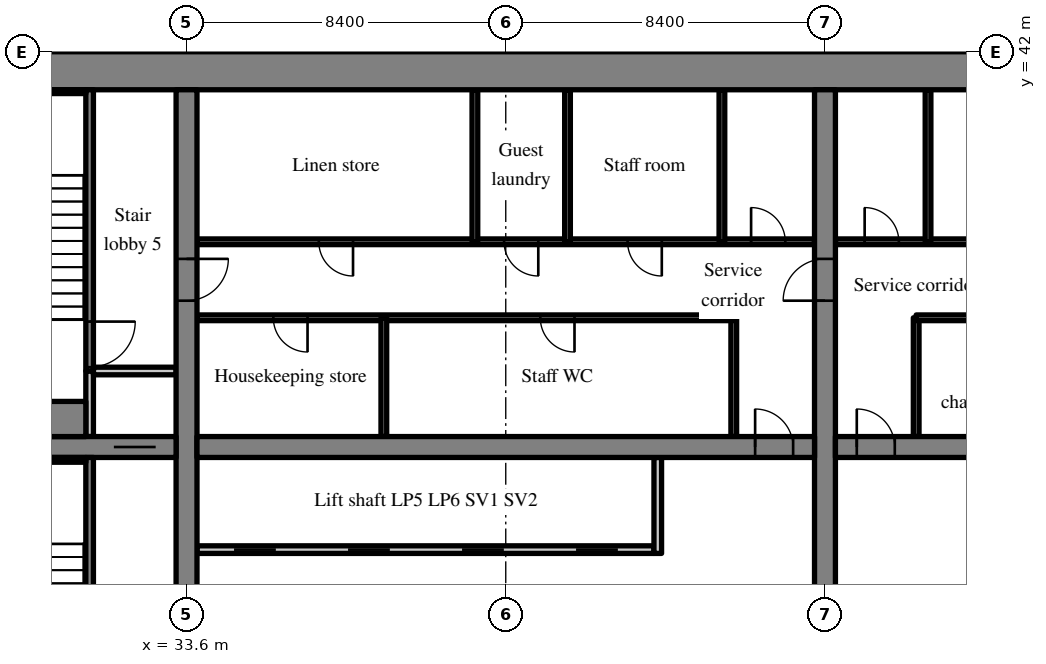
"""IFC4 building model, lengths in metres.
Left out: names, types, materials, properties, quantities, classifications, styles, units other than length and angle.
Written with IfcOpenShell. Run it as: python <this file> out.ifc"""

import sys

from ifc_helpers import new_model, si_unit, direction, frame, frame_2d, origin, place, context, subcontext, project, spatial, rectangle, extrude, source, transform, mapped, element, fill, save


model = new_model("IFC4")
c1 = context("Model", 3, precision=1e-05, world=origin(), true_north=direction((0.0, 1.0)))
c2 = subcontext(c1, "Body", "Model", "MODEL_VIEW")
j1 = project(units=[si_unit("LENGTHUNIT", "METRE"), si_unit("PLANEANGLEUNIT", "RADIAN")], contexts=[c1])
p1 = place(None, origin())
s1 = spatial("IfcSite", under=j1, at=p1, CompositionType="ELEMENT")
p2 = place(p1, origin())
s2 = spatial("IfcBuilding", under=s1, at=p2, CompositionType="ELEMENT")
p3 = place(p2, frame((0.0, 0.0, 58.2)))
s3 = spatial("IfcBuildingStorey", under=s2, at=p3, CompositionType="ELEMENT", Elevation=58.2)
m1 = source(origin(), c2, "Body", "SweptSolid", [
    extrude(rectangle(XDim=50.4, YDim=1.0, at=frame_2d((25.2, 0.0))), origin(), (0.0, 0.0, 1.0), 3.52),
])
p4 = place(p3, frame((25.2, 41.5, 0.0), z_axis=(0.0, 0.0, 1.0), x_axis=(1.0, 0.0, 0.0)))
e1 = element("IfcWall", 1, at=p4, inside=s3, PredefinedType="SHEAR", context=c2, shape_type="MappedRepresentation", body=[
    mapped(m1, transform((0.0, 0.0, 0.0), scale=1.0)),
])
m2 = source(origin(), c2, "Body", "SweptSolid", [
    extrude(rectangle(XDim=18.0, YDim=0.55, at=frame_2d((9.0, 0.0))), origin(), (0.0, 0.0, 1.0), 3.52),
])
p5 = place(p3, frame((33.6, 23.0, 0.0), z_axis=(0.0, 0.0, 1.0), x_axis=(0.0, 1.0, 0.0)))
e2 = element("IfcWall", 2, at=p5, inside=s3, PredefinedType="SHEAR", context=c2, shape_type="MappedRepresentation", body=[
    mapped(m2, transform((0.0, 0.0, 0.0), scale=1.0)),
])
m3 = source(origin(), c2, "Body", "SweptSolid", [
    extrude(rectangle(XDim=1.1, YDim=2.1, at=frame_2d((0.55, 1.05))), frame((0.0, 0.285, 0.0), z_axis=(0.0, -1.0, 0.0), x_axis=(1.0, 0.0, 0.0)), (0.0, 0.0, 1.0), 0.57),
])
p6 = place(p5, frame((12.45, 0.0, 0.0)))
e3 = element("IfcOpeningElement", 3, at=p6, cuts=e2, PredefinedType="OPENING", context=c2, shape_type="MappedRepresentation", body=[
    mapped(m3, transform((0.0, 0.0, 0.0), scale=1.0)),
])
p7 = place(p3, frame((50.4, 23.0, 0.0), z_axis=(0.0, 0.0, 1.0), x_axis=(0.0, 1.0, 0.0)))
e4 = element("IfcWall", 4, at=p7, inside=s3, PredefinedType="SHEAR", context=c2, shape_type="MappedRepresentation", body=[
    mapped(m2, transform((0.0, 0.0, 0.0), scale=1.0)),
])
p8 = place(p7, frame((12.45, 0.0, 0.0)))
e5 = element("IfcOpeningElement", 5, at=p8, cuts=e4, PredefinedType="OPENING", context=c2, shape_type="MappedRepresentation", body=[
    mapped(m3, transform((0.0, 0.0, 0.0), scale=1.0)),
])
m4 = source(origin(), c2, "Body", "SweptSolid", [
    extrude(rectangle(XDim=7.125, YDim=0.55, at=frame_2d((3.562, 0.0))), origin(), (0.0, 0.0, 1.0), 3.52),
])
p9 = place(p3, frame((26.2, 31.6, 0.0), z_axis=(0.0, 0.0, 1.0), x_axis=(1.0, 0.0, 0.0)))
e6 = element("IfcWall", 6, at=p9, inside=s3, PredefinedType="SHEAR", context=c2, shape_type="MappedRepresentation", body=[
    mapped(m4, transform((0.0, 0.0, 0.0), scale=1.0)),
])
p10 = place(p9, frame((5.488, 0.0, 0.0)))
e7 = element("IfcOpeningElement", 7, at=p10, cuts=e6, PredefinedType="OPENING", context=c2, shape_type="MappedRepresentation", body=[
    mapped(m3, transform((0.0, 0.0, 0.0), scale=1.0)),
])
m5 = source(origin(), c2, "Body", "SweptSolid", [
    extrude(rectangle(XDim=16.25, YDim=0.55, at=frame_2d((8.125, 0.0))), origin(), (0.0, 0.0, 1.0), 3.52),
])
p11 = place(p3, frame((33.875, 31.6, 0.0), z_axis=(0.0, 0.0, 1.0), x_axis=(1.0, 0.0, 0.0)))
e8 = element("IfcWall", 8, at=p11, inside=s3, PredefinedType="SHEAR", context=c2, shape_type="MappedRepresentation", body=[
    mapped(m5, transform((0.0, 0.0, 0.0), scale=1.0)),
])
m6 = source(origin(), c2, "Body", "SweptSolid", [
    extrude(rectangle(XDim=1.0, YDim=2.1, at=frame_2d((0.5, 1.05))), frame((0.0, 0.285, 0.0), z_axis=(0.0, -1.0, 0.0), x_axis=(1.0, 0.0, 0.0)), (0.0, 0.0, 1.0), 0.57),
])
p12 = place(p11, frame((14.687, 0.0, 0.0)))
e9 = element("IfcOpeningElement", 9, at=p12, cuts=e8, PredefinedType="OPENING", context=c2, shape_type="MappedRepresentation", body=[
    mapped(m6, transform((0.0, 0.0, 0.0), scale=1.0)),
])
p13 = place(p3, frame((50.675, 31.6, 0.0), z_axis=(0.0, 0.0, 1.0), x_axis=(1.0, 0.0, 0.0)))
e10 = element("IfcWall", 10, at=p13, inside=s3, PredefinedType="SHEAR", context=c2, shape_type="MappedRepresentation", body=[
    mapped(m5, transform((0.0, 0.0, 0.0), scale=1.0)),
])
p14 = place(p13, frame((0.562, 0.0, 0.0)))
e11 = element("IfcOpeningElement", 11, at=p14, cuts=e10, PredefinedType="OPENING", context=c2, shape_type="MappedRepresentation", body=[
    mapped(m6, transform((0.0, 0.0, 0.0), scale=1.0)),
])
m7 = source(origin(), c2, "Body", "SweptSolid", [
    extrude(rectangle(XDim=12.025, YDim=0.2, at=frame_2d((6.012, 0.0))), origin(), (0.0, 0.0, 1.0), 3.52),
])
p15 = place(p3, frame((33.875, 28.9, 0.0), z_axis=(0.0, 0.0, 1.0), x_axis=(1.0, 0.0, 0.0)))
e12 = element("IfcWall", 12, at=p15, inside=s3, PredefinedType="SOLIDWALL", context=c2, shape_type="MappedRepresentation", body=[
    mapped(m7, transform((0.0, 0.0, 0.0), scale=1.0)),
])
m8 = source(origin(), c2, "Body", "SweptSolid", [
    extrude(rectangle(XDim=1.1, YDim=2.1, at=frame_2d((0.55, 1.05))), frame((0.0, 0.11, 0.0), z_axis=(0.0, -1.0, 0.0), x_axis=(1.0, 0.0, 0.0)), (0.0, 0.0, 1.0), 0.22),
])
p16 = place(p15, frame((0.975, 0.0, 0.0)))
e13 = element("IfcOpeningElement", 13, at=p16, cuts=e12, PredefinedType="OPENING", context=c2, shape_type="MappedRepresentation", body=[
    mapped(m8, transform((0.0, 0.0, 0.0), scale=1.0)),
])
p17 = place(p15, frame((3.975, 0.0, 0.0)))
e14 = element("IfcOpeningElement", 14, at=p17, cuts=e12, PredefinedType="OPENING", context=c2, shape_type="MappedRepresentation", body=[
    mapped(m8, transform((0.0, 0.0, 0.0), scale=1.0)),
])
p18 = place(p15, frame((6.975, 0.0, 0.0)))
e15 = element("IfcOpeningElement", 15, at=p18, cuts=e12, PredefinedType="OPENING", context=c2, shape_type="MappedRepresentation", body=[
    mapped(m8, transform((0.0, 0.0, 0.0), scale=1.0)),
])
p19 = place(p15, frame((9.975, 0.0, 0.0)))
e16 = element("IfcOpeningElement", 16, at=p19, cuts=e12, PredefinedType="OPENING", context=c2, shape_type="MappedRepresentation", body=[
    mapped(m8, transform((0.0, 0.0, 0.0), scale=1.0)),
])
m9 = source(origin(), c2, "Body", "SweptSolid", [
    extrude(rectangle(XDim=2.525, YDim=0.2, at=frame_2d((1.262, 0.0))), origin(), (0.0, 0.0, 1.0), 3.52),
])
p20 = place(p3, frame((46.0, 28.8, 0.0), z_axis=(0.0, 0.0, 1.0), x_axis=(0.0, 1.0, 0.0)))
e17 = element("IfcWall", 17, at=p20, inside=s3, PredefinedType="SOLIDWALL", context=c2, shape_type="MappedRepresentation", body=[
    mapped(m9, transform((0.0, 0.0, 0.0), scale=1.0)),
])
m10 = source(origin(), c2, "Body", "SweptSolid", [
    extrude(rectangle(XDim=3.125, YDim=0.15, at=frame_2d((1.562, 0.0))), origin(), (0.0, 0.0, 1.0), 3.52),
])
p21 = place(p3, frame((48.0, 31.875, 0.0), z_axis=(0.0, 0.0, 1.0), x_axis=(0.0, 1.0, 0.0)))
e18 = element("IfcWall", 18, at=p21, inside=s3, PredefinedType="PARTITIONING", context=c2, shape_type="MappedRepresentation", body=[
    mapped(m10, transform((0.0, 0.0, 0.0), scale=1.0)),
])
m11 = source(origin(), c2, "Body", "SweptSolid", [
    extrude(rectangle(XDim=14.125, YDim=0.15, at=frame_2d((7.062, 0.0))), origin(), (0.0, 0.0, 1.0), 3.52),
])
p22 = place(p3, frame((33.875, 35.0, 0.0), z_axis=(0.0, 0.0, 1.0), x_axis=(1.0, 0.0, 0.0)))
e19 = element("IfcWall", 19, at=p22, inside=s3, PredefinedType="PARTITIONING", context=c2, shape_type="MappedRepresentation", body=[
    mapped(m11, transform((0.0, 0.0, 0.0), scale=1.0)),
])
m12 = source(origin(), c2, "Body", "SweptSolid", [
    extrude(rectangle(XDim=0.9, YDim=2.1, at=frame_2d((0.45, 1.05))), frame((0.0, 0.085, 0.0), z_axis=(0.0, -1.0, 0.0), x_axis=(1.0, 0.0, 0.0)), (0.0, 0.0, 1.0), 0.17),
])
p23 = place(p22, frame((2.009, 0.0, 0.0)))
e20 = element("IfcOpeningElement", 20, at=p23, cuts=e19, PredefinedType="OPENING", context=c2, shape_type="MappedRepresentation", body=[
    mapped(m12, transform((0.0, 0.0, 0.0), scale=1.0)),
])
p24 = place(p22, frame((9.034, 0.0, 0.0)))
e21 = element("IfcOpeningElement", 21, at=p24, cuts=e19, PredefinedType="OPENING", context=c2, shape_type="MappedRepresentation", body=[
    mapped(m12, transform((0.0, 0.0, 0.0), scale=1.0)),
])
m13 = source(origin(), c2, "Body", "SweptSolid", [
    extrude(rectangle(XDim=16.25, YDim=0.15, at=frame_2d((8.125, 0.0))), origin(), (0.0, 0.0, 1.0), 3.52),
])
p25 = place(p3, frame((33.875, 37.0, 0.0), z_axis=(0.0, 0.0, 1.0), x_axis=(1.0, 0.0, 0.0)))
e22 = element("IfcWall", 22, at=p25, inside=s3, PredefinedType="PARTITIONING", context=c2, shape_type="MappedRepresentation", body=[
    mapped(m13, transform((0.0, 0.0, 0.0), scale=1.0)),
])
p26 = place(p25, frame((3.206, 0.0, 0.0)))
e23 = element("IfcOpeningElement", 23, at=p26, cuts=e22, PredefinedType="OPENING", context=c2, shape_type="MappedRepresentation", body=[
    mapped(m12, transform((0.0, 0.0, 0.0), scale=1.0)),
])
p27 = place(p25, frame((8.081, 0.0, 0.0)))
e24 = element("IfcOpeningElement", 24, at=p27, cuts=e22, PredefinedType="OPENING", context=c2, shape_type="MappedRepresentation", body=[
    mapped(m12, transform((0.0, 0.0, 0.0), scale=1.0)),
])
p28 = place(p25, frame((11.331, 0.0, 0.0)))
e25 = element("IfcOpeningElement", 25, at=p28, cuts=e22, PredefinedType="OPENING", context=c2, shape_type="MappedRepresentation", body=[
    mapped(m12, transform((0.0, 0.0, 0.0), scale=1.0)),
])
p29 = place(p25, frame((14.581, 0.0, 0.0)))
e26 = element("IfcOpeningElement", 26, at=p29, cuts=e22, PredefinedType="OPENING", context=c2, shape_type="MappedRepresentation", body=[
    mapped(m12, transform((0.0, 0.0, 0.0), scale=1.0)),
])
p30 = place(p3, frame((38.792, 31.875, 0.0), z_axis=(0.0, 0.0, 1.0), x_axis=(0.0, 1.0, 0.0)))
e27 = element("IfcWall", 27, at=p30, inside=s3, PredefinedType="PARTITIONING", context=c2, shape_type="MappedRepresentation", body=[
    mapped(m10, transform((0.0, 0.0, 0.0), scale=1.0)),
])
m14 = source(origin(), c2, "Body", "SweptSolid", [
    extrude(rectangle(XDim=4.0, YDim=0.15, at=frame_2d((2.0, 0.0))), origin(), (0.0, 0.0, 1.0), 3.52),
])
for number, where, z_axis, x_axis in (
    (28, (41.188, 37.0, 0.0), (0.0, 0.0, 1.0), (0.0, 1.0, 0.0)),
    (29, (43.625, 37.0, 0.0), (0.0, 0.0, 1.0), (0.0, 1.0, 0.0)),
    (30, (47.688, 37.0, 0.0), (0.0, 0.0, 1.0), (0.0, 1.0, 0.0)),
):
    element("IfcWall", number, at=place(p3, frame(where, z_axis=z_axis, x_axis=x_axis)), inside=s3, PredefinedType="PARTITIONING", context=c2, shape_type="MappedRepresentation", body=[
        mapped(m14, transform((0.0, 0.0, 0.0), scale=1.0)),
    ])
p31 = place(p3, frame((52.8, 31.875, 0.0), z_axis=(0.0, 0.0, 1.0), x_axis=(0.0, 1.0, 0.0)))
e31 = element("IfcWall", 31, at=p31, inside=s3, PredefinedType="PARTITIONING", context=c2, shape_type="MappedRepresentation", body=[
    mapped(m10, transform((0.0, 0.0, 0.0), scale=1.0)),
])
p32 = place(p3, frame((66.925, 35.0, 0.0), z_axis=(0.0, 0.0, 1.0), x_axis=(-1.0, 0.0, 0.0)))
e32 = element("IfcWall", 32, at=p32, inside=s3, PredefinedType="PARTITIONING", context=c2, shape_type="MappedRepresentation", body=[
    mapped(m11, transform((0.0, 0.0, 0.0), scale=1.0)),
])
p33 = place(p32, frame((0.955, 0.0, 0.0)))
e33 = element("IfcOpeningElement", 33, at=p33, cuts=e32, PredefinedType="OPENING", context=c2, shape_type="MappedRepresentation", body=[
    mapped(m12, transform((0.0, 0.0, 0.0), scale=1.0)),
])
p34 = place(p32, frame((5.873, 0.0, 0.0)))
e34 = element("IfcOpeningElement", 34, at=p34, cuts=e32, PredefinedType="OPENING", context=c2, shape_type="MappedRepresentation", body=[
    mapped(m12, transform((0.0, 0.0, 0.0), scale=1.0)),
])
p35 = place(p32, frame((11.492, 0.0, 0.0)))
e35 = element("IfcOpeningElement", 35, at=p35, cuts=e32, PredefinedType="OPENING", context=c2, shape_type="MappedRepresentation", body=[
    mapped(m12, transform((0.0, 0.0, 0.0), scale=1.0)),
])
p36 = place(p3, frame((66.925, 37.0, 0.0), z_axis=(0.0, 0.0, 1.0), x_axis=(-1.0, 0.0, 0.0)))
e36 = element("IfcWall", 36, at=p36, inside=s3, PredefinedType="PARTITIONING", context=c2, shape_type="MappedRepresentation", body=[
    mapped(m13, transform((0.0, 0.0, 0.0), scale=1.0)),
])
p37 = place(p36, frame((0.769, 0.0, 0.0)))
e37 = element("IfcOpeningElement", 37, at=p37, cuts=e36, PredefinedType="OPENING", context=c2, shape_type="MappedRepresentation", body=[
    mapped(m12, transform((0.0, 0.0, 0.0), scale=1.0)),
])
p38 = place(p36, frame((3.613, 0.0, 0.0)))
e38 = element("IfcOpeningElement", 38, at=p38, cuts=e36, PredefinedType="OPENING", context=c2, shape_type="MappedRepresentation", body=[
    mapped(m12, transform((0.0, 0.0, 0.0), scale=1.0)),
])
p39 = place(p36, frame((9.3, 0.0, 0.0)))
e39 = element("IfcOpeningElement", 39, at=p39, cuts=e36, PredefinedType="OPENING", context=c2, shape_type="MappedRepresentation", body=[
    mapped(m12, transform((0.0, 0.0, 0.0), scale=1.0)),
])
p40 = place(p36, frame((14.581, 0.0, 0.0)))
e40 = element("IfcOpeningElement", 40, at=p40, cuts=e36, PredefinedType="OPENING", context=c2, shape_type="MappedRepresentation", body=[
    mapped(m12, transform((0.0, 0.0, 0.0), scale=1.0)),
])
p41 = place(p3, frame((53.112, 37.0, 0.0), z_axis=(0.0, 0.0, 1.0), x_axis=(0.0, 1.0, 0.0)))
e41 = element("IfcWall", 41, at=p41, inside=s3, PredefinedType="PARTITIONING", context=c2, shape_type="MappedRepresentation", body=[
    mapped(m14, transform((0.0, 0.0, 0.0), scale=1.0)),
])
m15 = source(origin(), c2, "Body", "SweptSolid", [
    extrude(rectangle(XDim=8.325, YDim=0.2, at=frame_2d((4.163, 0.0))), origin(), (0.0, 0.0, 1.0), 3.52),
])
p42 = place(p3, frame((31.05, 23.0, 0.0), z_axis=(0.0, 0.0, 1.0), x_axis=(0.0, 1.0, 0.0)))
e42 = element("IfcWall", 42, at=p42, inside=s3, PredefinedType="SOLIDWALL", context=c2, shape_type="MappedRepresentation", body=[
    mapped(m15, transform((0.0, 0.0, 0.0), scale=1.0)),
])
m16 = source(origin(), c2, "Body", "SweptSolid", [
    extrude(rectangle(XDim=1.2, YDim=2.1, at=frame_2d((0.6, 1.05))), frame((0.0, 0.11, 0.0), z_axis=(0.0, -1.0, 0.0), x_axis=(1.0, 0.0, 0.0)), (0.0, 0.0, 1.0), 0.22),
])
p43 = place(p42, frame((0.6, 0.0, 0.0)))
e43 = element("IfcOpeningElement", 43, at=p43, cuts=e42, PredefinedType="OPENING", context=c2, shape_type="MappedRepresentation", body=[
    mapped(m16, transform((0.0, 0.0, 0.0), scale=1.0)),
])
m17 = source(origin(), c2, "Body", "SweptSolid", [
    extrude(rectangle(XDim=1.725, YDim=0.2, at=frame_2d((0.863, 0.0))), origin(), (0.0, 0.0, 1.0), 3.52),
])
p44 = place(p3, frame((31.05, 31.875, 0.0), z_axis=(0.0, 0.0, 1.0), x_axis=(0.0, 1.0, 0.0)))
e44 = element("IfcWall", 44, at=p44, inside=s3, PredefinedType="SOLIDWALL", context=c2, shape_type="MappedRepresentation", body=[
    mapped(m17, transform((0.0, 0.0, 0.0), scale=1.0)),
])
m18 = source(origin(), c2, "Body", "SweptSolid", [
    extrude(rectangle(XDim=2.175, YDim=0.2, at=frame_2d((1.087, 0.0))), origin(), (0.0, 0.0, 1.0), 3.52),
])
p45 = place(p3, frame((31.15, 33.6, 0.0), z_axis=(0.0, 0.0, 1.0), x_axis=(1.0, 0.0, 0.0)))
e45 = element("IfcWall", 45, at=p45, inside=s3, PredefinedType="SOLIDWALL", context=c2, shape_type="MappedRepresentation", body=[
    mapped(m18, transform((0.0, 0.0, 0.0), scale=1.0)),
])
m19 = source(origin(), c2, "Body", "SweptSolid", [
    extrude(rectangle(XDim=7.4, YDim=0.2, at=frame_2d((3.7, 0.0))), origin(), (0.0, 0.0, 1.0), 3.52),
])
p46 = place(p3, frame((31.05, 33.6, 0.0), z_axis=(0.0, 0.0, 1.0), x_axis=(0.0, 1.0, 0.0)))
e46 = element("IfcWall", 46, at=p46, inside=s3, PredefinedType="SOLIDWALL", context=c2, shape_type="MappedRepresentation", body=[
    mapped(m19, transform((0.0, 0.0, 0.0), scale=1.0)),
])
p47 = place(p46, frame((0.1, 0.0, 0.0)))
e47 = element("IfcOpeningElement", 47, at=p47, cuts=e46, PredefinedType="OPENING", context=c2, shape_type="MappedRepresentation", body=[
    mapped(m16, transform((0.0, 0.0, 0.0), scale=1.0)),
])
m20 = source(origin(), c2, "Body", "SweptSolid", [
    extrude(rectangle(XDim=4.75, YDim=0.125, at=frame_2d((2.375, 0.0))), origin(), (0.0, 0.0, 1.0), 3.52),
])
p48 = place(p3, frame((26.2, 31.262, 0.0), z_axis=(0.0, 0.0, 1.0), x_axis=(1.0, 0.0, 0.0)))
e48 = element("IfcWall", 48, at=p48, inside=s3, PredefinedType="SOLIDWALL", context=c2, shape_type="MappedRepresentation", body=[
    mapped(m20, transform((0.0, 0.0, 0.0), scale=1.0)),
])
m21 = source(origin(), c2, "Body", "SweptSolid", [
    extrude(rectangle(XDim=4.75, YDim=0.1, at=frame_2d((2.375, 0.0))), origin(), (0.0, 0.0, 1.0), 3.52),
])
p49 = place(p3, frame((26.2, 40.95, 0.0), z_axis=(0.0, 0.0, 1.0), x_axis=(1.0, 0.0, 0.0)))
e49 = element("IfcWall", 49, at=p49, inside=s3, PredefinedType="SOLIDWALL", context=c2, shape_type="MappedRepresentation", body=[
    mapped(m21, transform((0.0, 0.0, 0.0), scale=1.0)),
])
m22 = source(origin(), c2, "Body", "SweptSolid", [
    extrude(rectangle(XDim=4.75, YDim=0.925, at=frame_2d((2.375, 0.0))), origin(), (0.0, 0.0, 1.0), 3.52),
])
p50 = place(p3, frame((26.2, 32.337, 0.0), z_axis=(0.0, 0.0, 1.0), x_axis=(1.0, 0.0, 0.0)))
e50 = element("IfcWall", 50, at=p50, inside=s3, PredefinedType="SOLIDWALL", context=c2, shape_type="MappedRepresentation", body=[
    mapped(m22, transform((0.0, 0.0, 0.0), scale=1.0)),
])
m23 = source(origin(), c2, "Body", "SweptSolid", [
    extrude(rectangle(XDim=1.0, YDim=2.1, at=frame_2d((0.5, 1.05))), frame((0.0, 0.025, 0.0), z_axis=(0.0, -1.0, 0.0), x_axis=(1.0, 0.0, 0.0)), (0.0, 0.0, 1.0), 0.05),
])
p51 = place(p12, origin())
e51 = element("IfcDoor", 51, at=p51, inside=s3, OperationType="SINGLE_SWING_LEFT", PredefinedType="DOOR", context=c2, shape_type="MappedRepresentation", body=[
    mapped(m23, transform((0.0, 0.0, 0.0), scale=1.0)),
])
fill(e9, e51)
m24 = source(origin(), c2, "Body", "SweptSolid", [
    extrude(rectangle(XDim=1.1, YDim=2.1, at=frame_2d((0.55, 1.05))), frame((0.0, 0.025, 0.0), z_axis=(0.0, -1.0, 0.0), x_axis=(1.0, 0.0, 0.0)), (0.0, 0.0, 1.0), 0.05),
])
p52 = place(p16, origin())
e52 = element("IfcDoor", 52, at=p52, inside=s3, OperationType="SLIDING_TO_LEFT", PredefinedType="DOOR", context=c2, shape_type="MappedRepresentation", body=[
    mapped(m24, transform((0.0, 0.0, 0.0), scale=1.0)),
])
fill(e13, e52)
p53 = place(p17, origin())
e53 = element("IfcDoor", 53, at=p53, inside=s3, OperationType="SLIDING_TO_RIGHT", PredefinedType="DOOR", context=c2, shape_type="MappedRepresentation", body=[
    mapped(m24, transform((0.0, 0.0, 0.0), scale=1.0)),
])
fill(e14, e53)
p54 = place(p18, origin())
e54 = element("IfcDoor", 54, at=p54, inside=s3, OperationType="SLIDING_TO_LEFT", PredefinedType="DOOR", context=c2, shape_type="MappedRepresentation", body=[
    mapped(m24, transform((0.0, 0.0, 0.0), scale=1.0)),
])
fill(e15, e54)
p55 = place(p19, origin())
e55 = element("IfcDoor", 55, at=p55, inside=s3, OperationType="SLIDING_TO_RIGHT", PredefinedType="DOOR", context=c2, shape_type="MappedRepresentation", body=[
    mapped(m24, transform((0.0, 0.0, 0.0), scale=1.0)),
])
fill(e16, e55)
m25 = source(origin(), c2, "Body", "SweptSolid", [
    extrude(rectangle(XDim=0.9, YDim=2.1, at=frame_2d((0.45, 1.05))), frame((0.0, 0.025, 0.0), z_axis=(0.0, -1.0, 0.0), x_axis=(1.0, 0.0, 0.0)), (0.0, 0.0, 1.0), 0.05),
])
p56 = place(p23, origin())
e56 = element("IfcDoor", 56, at=p56, inside=s3, OperationType="SINGLE_SWING_RIGHT", PredefinedType="DOOR", context=c2, shape_type="MappedRepresentation", body=[
    mapped(m25, transform((0.0, 0.0, 0.0), scale=1.0)),
])
fill(e20, e56)
p57 = place(p24, origin())
e57 = element("IfcDoor", 57, at=p57, inside=s3, OperationType="SINGLE_SWING_RIGHT", PredefinedType="DOOR", context=c2, shape_type="MappedRepresentation", body=[
    mapped(m25, transform((0.0, 0.0, 0.0), scale=1.0)),
])
fill(e21, e57)
p58 = place(p26, origin())
e58 = element("IfcDoor", 58, at=p58, inside=s3, OperationType="SINGLE_SWING_RIGHT", PredefinedType="DOOR", context=c2, shape_type="MappedRepresentation", body=[
    mapped(m25, transform((0.0, 0.0, 0.0), scale=1.0)),
])
fill(e23, e58)
p59 = place(p27, origin())
e59 = element("IfcDoor", 59, at=p59, inside=s3, OperationType="SINGLE_SWING_RIGHT", PredefinedType="DOOR", context=c2, shape_type="MappedRepresentation", body=[
    mapped(m25, transform((0.0, 0.0, 0.0), scale=1.0)),
])
fill(e24, e59)
p60 = place(p28, origin())
e60 = element("IfcDoor", 60, at=p60, inside=s3, OperationType="SINGLE_SWING_RIGHT", PredefinedType="DOOR", context=c2, shape_type="MappedRepresentation", body=[
    mapped(m25, transform((0.0, 0.0, 0.0), scale=1.0)),
])
fill(e25, e60)
p61 = place(p29, origin())
e61 = element("IfcDoor", 61, at=p61, inside=s3, OperationType="SINGLE_SWING_LEFT", PredefinedType="DOOR", context=c2, shape_type="MappedRepresentation", body=[
    mapped(m25, transform((0.0, 0.0, 0.0), scale=1.0)),
])
fill(e26, e61)
p62 = place(p14, origin())
e62 = element("IfcDoor", 62, at=p62, inside=s3, OperationType="SINGLE_SWING_LEFT", PredefinedType="DOOR", context=c2, shape_type="MappedRepresentation", body=[
    mapped(m23, transform((0.0, 0.0, 0.0), scale=1.0)),
])
fill(e11, e62)
p63 = place(p40, origin())
e63 = element("IfcDoor", 63, at=p63, inside=s3, OperationType="SINGLE_SWING_RIGHT", PredefinedType="DOOR", context=c2, shape_type="MappedRepresentation", body=[
    mapped(m25, transform((0.0, 0.0, 0.0), scale=1.0)),
])
fill(e40, e63)
p64 = place(p10, origin())
e64 = element("IfcDoor", 64, at=p64, inside=s3, OperationType="SLIDING_TO_RIGHT", PredefinedType="DOOR", context=c2, shape_type="MappedRepresentation", body=[
    mapped(m24, transform((0.0, 0.0, 0.0), scale=1.0)),
])
fill(e7, e64)
m26 = source(origin(), c2, "Body", "SweptSolid", [
    extrude(rectangle(XDim=1.2, YDim=2.1, at=frame_2d((0.6, 1.05))), frame((0.0, 0.025, 0.0), z_axis=(0.0, -1.0, 0.0), x_axis=(1.0, 0.0, 0.0)), (0.0, 0.0, 1.0), 0.05),
])
p65 = place(p47, origin())
e65 = element("IfcDoor", 65, at=p65, inside=s3, OperationType="SINGLE_SWING_RIGHT", PredefinedType="DOOR", context=c2, shape_type="MappedRepresentation", body=[
    mapped(m26, transform((0.0, 0.0, 0.0), scale=1.0)),
])
fill(e47, e65)
p66 = place(p6, origin())
e66 = element("IfcDoor", 66, at=p66, inside=s3, OperationType="SINGLE_SWING_RIGHT", PredefinedType="DOOR", context=c2, shape_type="MappedRepresentation", body=[
    mapped(m24, transform((0.0, 0.0, 0.0), scale=1.0)),
])
fill(e3, e66)
p67 = place(p8, origin())
e67 = element("IfcDoor", 67, at=p67, inside=s3, OperationType="SINGLE_SWING_LEFT", PredefinedType="DOOR", context=c2, shape_type="MappedRepresentation", body=[
    mapped(m24, transform((0.0, 0.0, 0.0), scale=1.0)),
])
fill(e5, e67)
save(model, sys.argv[1])
